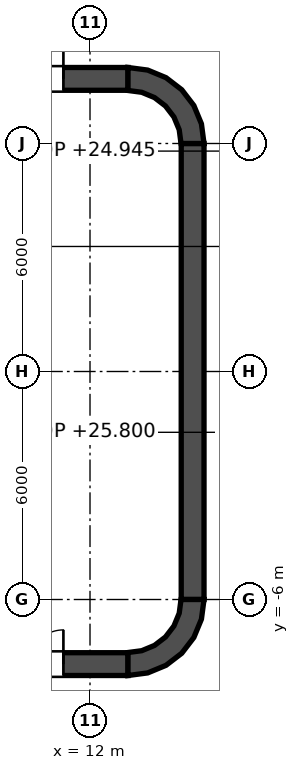
"""IFC4 building model, lengths in metres.
Left out: names, types, materials, properties, quantities, classifications, styles, units other than length and angle.
Written with IfcOpenShell. Run it as: python <this file> out.ifc"""

import sys

from ifc_helpers import new_model, si_unit, direction, frame, frame_2d, origin, place, context, subcontext, project, spatial, polyline, rectangle, outline, extrude, element, fill, save


model = new_model("IFC4")
c1 = context("Model", 3, precision=1e-05, world=origin(), true_north=direction((0.0, 1.0)))
c2 = subcontext(c1, "Body", "Model", "MODEL_VIEW")
j1 = project(units=[si_unit("LENGTHUNIT", "METRE"), si_unit("PLANEANGLEUNIT", "RADIAN")], contexts=[c1])
p1 = place(None, origin())
s1 = spatial("IfcSite", under=j1, at=p1, CompositionType="ELEMENT")
p2 = place(p1, origin())
s2 = spatial("IfcBuilding", under=s1, at=p2, CompositionType="ELEMENT")
p3 = place(p2, frame((0.0, 0.0, 17.0)))
s3 = spatial("IfcBuildingStorey", under=s2, at=p3, CompositionType="ELEMENT", Elevation=17.0)
p4 = place(p3, frame((-13.0, 7.7, 0.0), z_axis=(0.0, 0.0, 1.0), x_axis=(1.0, 0.0, 0.0)))
e1 = element("IfcWall", 1, at=p4, inside=s3, PredefinedType="SHEAR", context=c2, shape_type="SweptSolid", body=[
    extrude(rectangle(XDim=26.0, YDim=0.6, at=frame_2d((13.0, 0.0))), origin(), (0.0, 0.0, 1.0), 9.0),
])
p5 = place(p4, frame((1.7, 0.0, 0.0)))
e2 = element("IfcOpeningElement", 2, at=p5, cuts=e1, PredefinedType="OPENING", context=c2, shape_type="SweptSolid", body=[
    extrude(rectangle(XDim=1.8, YDim=2.1, at=frame_2d((0.9, 1.05))), frame((0.0, 0.3, 0.0), z_axis=(0.0, -1.0, 0.0), x_axis=(1.0, 0.0, 0.0)), (0.0, 0.0, 1.0), 0.6),
])
p6 = place(p4, frame((22.5, 0.0, 0.0)))
e3 = element("IfcOpeningElement", 3, at=p6, cuts=e1, PredefinedType="OPENING", context=c2, shape_type="SweptSolid", body=[
    extrude(rectangle(XDim=1.8, YDim=2.1, at=frame_2d((0.9, 1.05))), frame((0.0, 0.3, 0.0), z_axis=(0.0, -1.0, 0.0), x_axis=(1.0, 0.0, 0.0)), (0.0, 0.0, 1.0), 0.6),
])
p7 = place(p3, frame((-13.0, -7.7, 0.0), z_axis=(0.0, 0.0, 1.0), x_axis=(1.0, 0.0, 0.0)))
e4 = element("IfcWall", 4, at=p7, inside=s3, PredefinedType="SHEAR", context=c2, shape_type="SweptSolid", body=[
    extrude(rectangle(XDim=26.0, YDim=0.6, at=frame_2d((13.0, 0.0))), origin(), (0.0, 0.0, 1.0), 9.0),
])
p8 = place(p7, frame((1.7, 0.0, 0.0)))
e5 = element("IfcOpeningElement", 5, at=p8, cuts=e4, PredefinedType="OPENING", context=c2, shape_type="SweptSolid", body=[
    extrude(rectangle(XDim=1.8, YDim=2.1, at=frame_2d((0.9, 1.05))), frame((0.0, 0.3, 0.0), z_axis=(0.0, -1.0, 0.0), x_axis=(1.0, 0.0, 0.0)), (0.0, 0.0, 1.0), 0.6),
])
p9 = place(p7, frame((22.5, 0.0, 0.0)))
e6 = element("IfcOpeningElement", 6, at=p9, cuts=e4, PredefinedType="OPENING", context=c2, shape_type="SweptSolid", body=[
    extrude(rectangle(XDim=1.8, YDim=2.1, at=frame_2d((0.9, 1.05))), frame((0.0, 0.3, 0.0), z_axis=(0.0, -1.0, 0.0), x_axis=(1.0, 0.0, 0.0)), (0.0, 0.0, 1.0), 0.6),
])
p10 = place(p3, frame((14.7, -6.0, 0.0), z_axis=(0.0, 0.0, 1.0), x_axis=(0.0, 1.0, 0.0)))
e7 = element("IfcWall", 7, at=p10, inside=s3, PredefinedType="SHEAR", context=c2, shape_type="SweptSolid", body=[
    extrude(rectangle(XDim=12.0, YDim=0.6, at=frame_2d((6.0, 0.0))), origin(), (0.0, 0.0, 1.0), 9.0),
])
p11 = place(p3, origin())
e8 = element("IfcWall", 8, at=p11, inside=s3, PredefinedType="SHEAR", context=c2, shape_type="SweptSolid", body=[
    extrude(outline(polyline([(13.0, 8.0), (13.0, 7.395), (13.361, 7.347), (13.698, 7.208), (13.986, 6.986), (14.208, 6.698), (14.347, 6.361), (14.395, 6.0), (15.0, 6.0), (14.932, 6.518), (14.732, 7.0), (14.414, 7.414), (14.0, 7.732), (13.518, 7.932), (13.0, 8.0)])), origin(), (0.0, 0.0, 1.0), 9.0),
])
e9 = element("IfcWall", 9, at=p11, inside=s3, PredefinedType="SHEAR", context=c2, shape_type="SweptSolid", body=[
    extrude(outline(polyline([(15.0, -6.0), (14.395, -6.0), (14.347, -6.361), (14.208, -6.698), (13.986, -6.986), (13.698, -7.208), (13.361, -7.347), (13.0, -7.395), (13.0, -8.0), (13.518, -7.932), (14.0, -7.732), (14.414, -7.414), (14.732, -7.0), (14.932, -6.518), (15.0, -6.0)])), origin(), (0.0, 0.0, 1.0), 9.0),
])
p12 = place(p3, frame((11.8, -7.4, 0.0), z_axis=(0.0, 0.0, 1.0), x_axis=(0.0, 1.0, 0.0)))
e10 = element("IfcWall", 10, at=p12, inside=s3, PredefinedType="SOLIDWALL", context=c2, shape_type="SweptSolid", body=[
    extrude(rectangle(XDim=14.8, YDim=0.4, at=frame_2d((7.4, 0.0))), origin(), (0.0, 0.0, 1.0), 8.8),
])
p13 = place(p12, frame((11.2, 0.0, 0.0)))
e11 = element("IfcOpeningElement", 11, at=p13, cuts=e10, PredefinedType="OPENING", context=c2, shape_type="SweptSolid", body=[
    extrude(rectangle(XDim=1.1, YDim=2.1, at=frame_2d((0.55, 1.05))), frame((0.0, 0.2, 0.0), z_axis=(0.0, -1.0, 0.0), x_axis=(1.0, 0.0, 0.0)), (0.0, 0.0, 1.0), 0.4),
])
p14 = place(p12, frame((8.3, 0.0, 0.0)))
e12 = element("IfcOpeningElement", 12, at=p14, cuts=e10, PredefinedType="OPENING", context=c2, shape_type="SweptSolid", body=[
    extrude(rectangle(XDim=1.1, YDim=2.1, at=frame_2d((0.55, 1.05))), frame((0.0, 0.2, 0.0), z_axis=(0.0, -1.0, 0.0), x_axis=(1.0, 0.0, 0.0)), (0.0, 0.0, 1.0), 0.4),
])
p15 = place(p12, frame((5.4, 0.0, 0.0)))
e13 = element("IfcOpeningElement", 13, at=p15, cuts=e10, PredefinedType="OPENING", context=c2, shape_type="SweptSolid", body=[
    extrude(rectangle(XDim=1.1, YDim=2.1, at=frame_2d((0.55, 1.05))), frame((0.0, 0.2, 0.0), z_axis=(0.0, -1.0, 0.0), x_axis=(1.0, 0.0, 0.0)), (0.0, 0.0, 1.0), 0.4),
])
p16 = place(p12, frame((13.552, 0.0, 0.0)))
e14 = element("IfcOpeningElement", 14, at=p16, cuts=e10, PredefinedType="OPENING", context=c2, shape_type="SweptSolid", body=[
    extrude(rectangle(XDim=0.9, YDim=2.1, at=frame_2d((0.45, 1.05))), frame((0.0, 0.2, 0.0), z_axis=(0.0, -1.0, 0.0), x_axis=(1.0, 0.0, 0.0)), (0.0, 0.0, 1.0), 0.4),
])
p17 = place(p12, frame((0.347, 0.0, 0.0)))
e15 = element("IfcOpeningElement", 15, at=p17, cuts=e10, PredefinedType="OPENING", context=c2, shape_type="SweptSolid", body=[
    extrude(rectangle(XDim=0.9, YDim=2.1, at=frame_2d((0.45, 1.05))), frame((0.0, 0.2, 0.0), z_axis=(0.0, -1.0, 0.0), x_axis=(1.0, 0.0, 0.0)), (0.0, 0.0, 1.0), 0.4),
])
e16 = element("IfcWall", 16, at=p11, inside=s3, PredefinedType="SOLIDWALL", context=c2, shape_type="SweptSolid", body=[
    extrude(outline(polyline([(12.0, -5.675), (12.0, -5.925), (14.15, -5.925), (14.4, -5.925), (14.4, -5.675), (14.4, -3.025), (14.4, -2.775), (14.4, -0.125), (14.4, 0.125), (14.4, 2.775), (14.4, 3.025), (14.4, 5.675), (14.4, 5.925), (14.15, 5.925), (12.0, 5.925), (12.0, 5.675), (14.15, 5.675), (14.15, 3.025), (12.0, 3.025), (12.0, 2.775), (14.15, 2.775), (14.15, 0.125), (12.0, 0.125), (12.0, -0.125), (14.15, -0.125), (14.15, -2.775), (12.0, -2.775), (12.0, -3.025), (14.15, -3.025), (14.15, -5.675), (12.0, -5.675)])), origin(), (0.0, 0.0, 1.0), 8.8),
])
p18 = place(p13, origin())
e17 = element("IfcDoor", 17, at=p18, inside=s3, OperationType="DOUBLE_DOOR_SLIDING", PredefinedType="DOOR", context=c2, shape_type="SweptSolid", body=[
    extrude(rectangle(XDim=1.1, YDim=2.1, at=frame_2d((0.55, 1.05))), frame((0.0, 0.025, 0.0), z_axis=(0.0, -1.0, 0.0), x_axis=(1.0, 0.0, 0.0)), (0.0, 0.0, 1.0), 0.05),
])
fill(e11, e17)
p19 = place(p14, origin())
e18 = element("IfcDoor", 18, at=p19, inside=s3, OperationType="DOUBLE_DOOR_SLIDING", PredefinedType="DOOR", context=c2, shape_type="SweptSolid", body=[
    extrude(rectangle(XDim=1.1, YDim=2.1, at=frame_2d((0.55, 1.05))), frame((0.0, 0.025, 0.0), z_axis=(0.0, -1.0, 0.0), x_axis=(1.0, 0.0, 0.0)), (0.0, 0.0, 1.0), 0.05),
])
fill(e12, e18)
p20 = place(p15, origin())
e19 = element("IfcDoor", 19, at=p20, inside=s3, OperationType="DOUBLE_DOOR_SLIDING", PredefinedType="DOOR", context=c2, shape_type="SweptSolid", body=[
    extrude(rectangle(XDim=1.1, YDim=2.1, at=frame_2d((0.55, 1.05))), frame((0.0, 0.025, 0.0), z_axis=(0.0, -1.0, 0.0), x_axis=(1.0, 0.0, 0.0)), (0.0, 0.0, 1.0), 0.05),
])
fill(e13, e19)
p21 = place(p16, origin())
e20 = element("IfcDoor", 20, at=p21, inside=s3, OperationType="SINGLE_SWING_RIGHT", PredefinedType="DOOR", context=c2, shape_type="SweptSolid", body=[
    extrude(rectangle(XDim=0.9, YDim=2.1, at=frame_2d((0.45, 1.05))), frame((0.0, 0.025, 0.0), z_axis=(0.0, -1.0, 0.0), x_axis=(1.0, 0.0, 0.0)), (0.0, 0.0, 1.0), 0.05),
])
fill(e14, e20)
p22 = place(p17, origin())
e21 = element("IfcDoor", 21, at=p22, inside=s3, OperationType="SINGLE_SWING_RIGHT", PredefinedType="DOOR", context=c2, shape_type="SweptSolid", body=[
    extrude(rectangle(XDim=0.9, YDim=2.1, at=frame_2d((0.45, 1.05))), frame((0.0, 0.025, 0.0), z_axis=(0.0, -1.0, 0.0), x_axis=(1.0, 0.0, 0.0)), (0.0, 0.0, 1.0), 0.05),
])
fill(e15, e21)
p23 = place(p6, origin())
e22 = element("IfcDoor", 22, at=p23, inside=s3, OperationType="DOUBLE_DOOR_SINGLE_SWING", PredefinedType="DOOR", context=c2, shape_type="SweptSolid", body=[
    extrude(rectangle(XDim=1.8, YDim=2.1, at=frame_2d((0.9, 1.05))), frame((0.0, 0.025, 0.0), z_axis=(0.0, -1.0, 0.0), x_axis=(1.0, 0.0, 0.0)), (0.0, 0.0, 1.0), 0.05),
])
fill(e3, e22)
p24 = place(p9, origin())
e23 = element("IfcDoor", 23, at=p24, inside=s3, OperationType="DOUBLE_DOOR_SINGLE_SWING", PredefinedType="DOOR", context=c2, shape_type="SweptSolid", body=[
    extrude(rectangle(XDim=1.8, YDim=2.1, at=frame_2d((0.9, 1.05))), frame((0.0, 0.025, 0.0), z_axis=(0.0, -1.0, 0.0), x_axis=(1.0, 0.0, 0.0)), (0.0, 0.0, 1.0), 0.05),
])
fill(e6, e23)
save(model, sys.argv[1])
